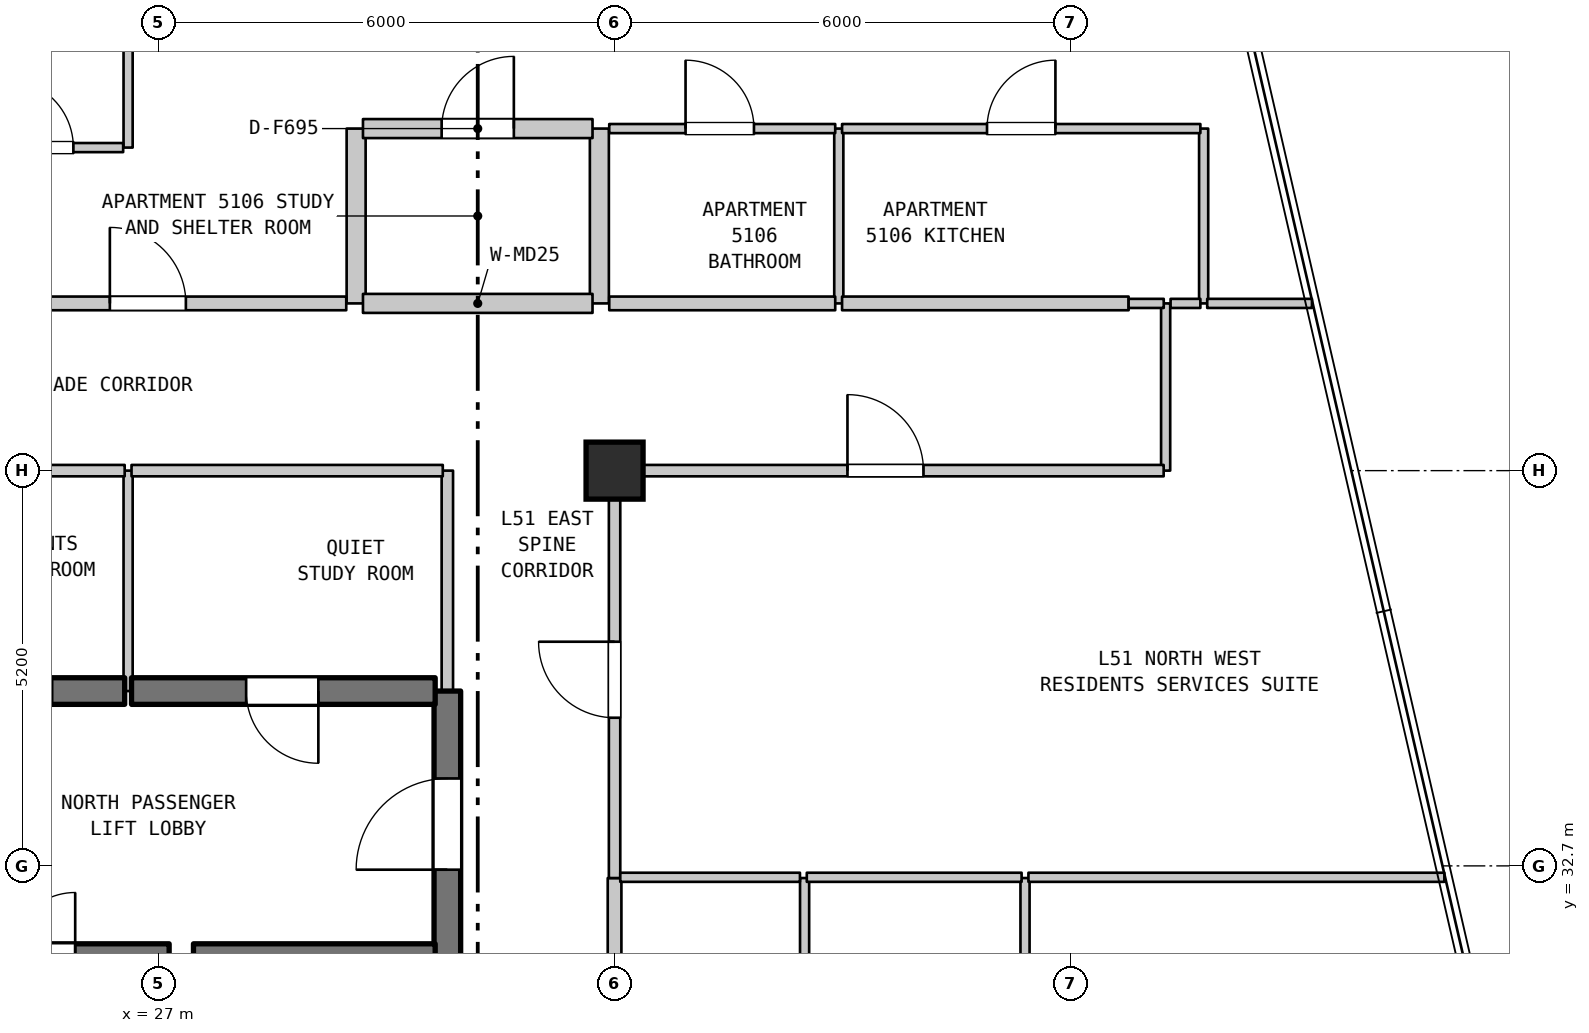
"""IFC4 building model, lengths in metres.
Left out: names, types, materials, properties, quantities, classifications, styles, units other than length and angle.
Written with IfcOpenShell. Run it as: python <this file> out.ifc"""

import sys

from ifc_helpers import new_model, si_unit, direction, frame, frame_2d, origin, origin_2d, place, context, subcontext, project, spatial, rectangle, extrude, element, fill, save


model = new_model("IFC4")
c1 = context("Model", 3, precision=1e-05, world=origin(), true_north=direction((0.0, 1.0)))
c2 = subcontext(c1, "Body", "Model", "MODEL_VIEW")
j1 = project(units=[si_unit("LENGTHUNIT", "METRE"), si_unit("PLANEANGLEUNIT", "RADIAN")], contexts=[c1])
p1 = place(None, origin())
s1 = spatial("IfcSite", under=j1, at=p1, CompositionType="ELEMENT")
p2 = place(p1, origin())
s2 = spatial("IfcBuilding", under=s1, at=p2, CompositionType="ELEMENT")
p3 = place(p2, frame((0.0, 0.0, 206.9)))
s3 = spatial("IfcBuildingStorey", under=s2, at=p3, CompositionType="ELEMENT", Elevation=206.9)
p4 = place(p3, frame((33.0, 37.9, 0.0), z_axis=(0.0, 0.0, 1.0), x_axis=(1.0, 0.0, 0.0)))
e1 = element("IfcColumn", 1, at=p4, inside=s3, PredefinedType="COLUMN", context=c2, shape_type="SweptSolid", body=[
    extrude(rectangle(XDim=0.75, YDim=0.75, at=origin_2d()), origin(), (0.0, 0.0, 1.0), 3.7),
])
p5 = place(p3, frame((26.6, 35.0, 0.0), z_axis=(0.0, 0.0, 1.0), x_axis=(0.0, 1.0, 0.0)))
e2 = element("IfcWall", 2, at=p5, inside=s3, PredefinedType="PARTITIONING", context=c2, shape_type="SweptSolid", body=[
    extrude(rectangle(XDim=2.9, YDim=0.12, at=frame_2d((1.45, 0.0))), origin(), (0.0, 0.0, 1.0), 3.39),
])
p6 = place(p3, frame((26.6, 42.15, 0.0), z_axis=(0.0, 0.0, 1.0), x_axis=(0.0, 1.0, 0.0)))
e3 = element("IfcWall", 3, at=p6, inside=s3, PredefinedType="PARTITIONING", context=c2, shape_type="SweptSolid", body=[
    extrude(rectangle(XDim=11.74, YDim=0.12, at=frame_2d((5.87, 0.0))), origin(), (0.0, 0.0, 1.0), 3.39),
])
p7 = place(p3, frame((29.6, 40.1, 0.0), z_axis=(0.0, 0.0, 1.0), x_axis=(0.0, 1.0, 0.0)))
e4 = element("IfcWall", 4, at=p7, inside=s3, PredefinedType="STANDARD", context=c2, shape_type="SweptSolid", body=[
    extrude(rectangle(XDim=2.3, YDim=0.25, at=frame_2d((1.15, 0.0))), origin(), (0.0, 0.0, 1.0), 3.39),
])
p8 = place(p3, frame((30.8, 31.5, 0.0), z_axis=(0.0, 0.0, 1.0), x_axis=(0.0, 1.0, 0.0)))
e5 = element("IfcWall", 5, at=p8, inside=s3, PredefinedType="SHEAR", context=c2, shape_type="SweptSolid", body=[
    extrude(rectangle(XDim=3.5, YDim=0.35, at=frame_2d((1.75, 0.0))), origin(), (0.0, 0.0, 1.0), 3.39),
])
p9 = place(p8, frame((1.15, 0.0, 0.0)))
e6 = element("IfcOpeningElement", 6, at=p9, cuts=e5, PredefinedType="OPENING", context=c2, shape_type="SweptSolid", body=[
    extrude(rectangle(XDim=1.2, YDim=2.2, at=frame_2d((0.6, 1.1))), frame((0.0, 0.185, 0.0), z_axis=(0.0, -1.0, 0.0), x_axis=(1.0, 0.0, 0.0)), (0.0, 0.0, 1.0), 0.37),
])
p10 = place(p3, frame((30.8, 35.0, 0.0), z_axis=(0.0, 0.0, 1.0), x_axis=(0.0, 1.0, 0.0)))
e7 = element("IfcWall", 7, at=p10, inside=s3, PredefinedType="STANDARD", context=c2, shape_type="SweptSolid", body=[
    extrude(rectangle(XDim=2.9, YDim=0.15, at=frame_2d((1.45, 0.0))), origin(), (0.0, 0.0, 1.0), 3.39),
])
p11 = place(p3, frame((32.8, 40.1, 0.0), z_axis=(0.0, 0.0, 1.0), x_axis=(0.0, 1.0, 0.0)))
e8 = element("IfcWall", 8, at=p11, inside=s3, PredefinedType="STANDARD", context=c2, shape_type="SweptSolid", body=[
    extrude(rectangle(XDim=2.3, YDim=0.25, at=frame_2d((1.15, 0.0))), origin(), (0.0, 0.0, 1.0), 3.39),
])
p12 = place(p3, frame((33.0, 27.47, 0.0), z_axis=(0.0, 0.0, 1.0), x_axis=(0.0, 1.0, 0.0)))
e9 = element("IfcWall", 9, at=p12, inside=s3, PredefinedType="STANDARD", context=c2, shape_type="SweptSolid", body=[
    extrude(rectangle(XDim=5.07, YDim=0.18, at=frame_2d((2.535, 0.0))), origin(), (0.0, 0.0, 1.0), 2.89),
])
p13 = place(p3, frame((33.0, 32.54, 0.0), z_axis=(0.0, 0.0, 1.0), x_axis=(0.0, 1.0, 0.0)))
e10 = element("IfcWall", 10, at=p13, inside=s3, PredefinedType="STANDARD", context=c2, shape_type="SweptSolid", body=[
    extrude(rectangle(XDim=5.36, YDim=0.15, at=frame_2d((2.68, 0.0))), origin(), (0.0, 0.0, 1.0), 2.89),
])
p14 = place(p13, frame((2.109, 0.0, 0.0)))
e11 = element("IfcOpeningElement", 11, at=p14, cuts=e10, PredefinedType="OPENING", context=c2, shape_type="SweptSolid", body=[
    extrude(rectangle(XDim=1.0, YDim=2.15, at=frame_2d((0.5, 1.075))), frame((0.0, 0.085, 0.0), z_axis=(0.0, -1.0, 0.0), x_axis=(1.0, 0.0, 0.0)), (0.0, 0.0, 1.0), 0.17),
])
p15 = place(p3, frame((35.5, 27.47, 0.0), z_axis=(0.0, 0.0, 1.0), x_axis=(0.0, 1.0, 0.0)))
e12 = element("IfcWall", 12, at=p15, inside=s3, PredefinedType="PARTITIONING", context=c2, shape_type="SweptSolid", body=[
    extrude(rectangle(XDim=5.07, YDim=0.12, at=frame_2d((2.535, 0.0))), origin(), (0.0, 0.0, 1.0), 3.39),
])
p16 = place(p3, frame((35.95, 40.1, 0.0), z_axis=(0.0, 0.0, 1.0), x_axis=(0.0, 1.0, 0.0)))
e13 = element("IfcWall", 13, at=p16, inside=s3, PredefinedType="PARTITIONING", context=c2, shape_type="SweptSolid", body=[
    extrude(rectangle(XDim=2.3, YDim=0.12, at=frame_2d((1.15, 0.0))), origin(), (0.0, 0.0, 1.0), 3.39),
])
p17 = place(p3, frame((38.4, 27.47, 0.0), z_axis=(0.0, 0.0, 1.0), x_axis=(0.0, 1.0, 0.0)))
e14 = element("IfcWall", 14, at=p17, inside=s3, PredefinedType="PARTITIONING", context=c2, shape_type="SweptSolid", body=[
    extrude(rectangle(XDim=5.07, YDim=0.12, at=frame_2d((2.535, 0.0))), origin(), (0.0, 0.0, 1.0), 3.39),
])
p18 = place(p3, frame((40.25, 37.9, 0.0), z_axis=(0.0, 0.0, 1.0), x_axis=(0.0, 1.0, 0.0)))
e15 = element("IfcWall", 15, at=p18, inside=s3, PredefinedType="PARTITIONING", context=c2, shape_type="SweptSolid", body=[
    extrude(rectangle(XDim=2.2, YDim=0.12, at=frame_2d((1.1, 0.0))), origin(), (0.0, 0.0, 1.0), 3.39),
])
p19 = place(p3, frame((40.75, 40.1, 0.0), z_axis=(0.0, 0.0, 1.0), x_axis=(0.0, 1.0, 0.0)))
e16 = element("IfcWall", 16, at=p19, inside=s3, PredefinedType="PARTITIONING", context=c2, shape_type="SweptSolid", body=[
    extrude(rectangle(XDim=2.3, YDim=0.12, at=frame_2d((1.15, 0.0))), origin(), (0.0, 0.0, 1.0), 3.39),
])
p20 = place(p3, frame((23.96, 31.5, 0.0), z_axis=(0.0, 0.0, 1.0), x_axis=(1.0, 0.0, 0.0)))
e17 = element("IfcWall", 17, at=p20, inside=s3, PredefinedType="SHEAR", context=c2, shape_type="SweptSolid", body=[
    extrude(rectangle(XDim=3.18, YDim=0.35, at=frame_2d((1.59, 0.0))), origin(), (0.0, 0.0, 1.0), 3.39),
])
p21 = place(p20, frame((1.094, 0.0, 0.0)))
e18 = element("IfcOpeningElement", 18, at=p21, cuts=e17, PredefinedType="OPENING", context=c2, shape_type="SweptSolid", body=[
    extrude(rectangle(XDim=0.85, YDim=2.1, at=frame_2d((0.425, 1.05))), frame((0.0, 0.185, 0.0), z_axis=(0.0, -1.0, 0.0), x_axis=(1.0, 0.0, 0.0)), (0.0, 0.0, 1.0), 0.37),
])
p22 = place(p3, frame((27.46, 31.5, 0.0), z_axis=(0.0, 0.0, 1.0), x_axis=(1.0, 0.0, 0.0)))
e19 = element("IfcWall", 19, at=p22, inside=s3, PredefinedType="SHEAR", context=c2, shape_type="SweptSolid", body=[
    extrude(rectangle(XDim=3.18, YDim=0.35, at=frame_2d((1.59, 0.0))), origin(), (0.0, 0.0, 1.0), 3.39),
])
p23 = place(p3, frame((33.075, 32.55, 0.0), z_axis=(0.0, 0.0, 1.0), x_axis=(1.0, 0.0, 0.0)))
e20 = element("IfcWall", 20, at=p23, inside=s3, PredefinedType="PARTITIONING", context=c2, shape_type="SweptSolid", body=[
    extrude(rectangle(XDim=2.364, YDim=0.12, at=frame_2d((1.182, 0.0))), origin(), (0.0, 0.0, 1.0), 3.39),
])
p24 = place(p3, frame((35.529, 32.55, 0.0), z_axis=(0.0, 0.0, 1.0), x_axis=(1.0, 0.0, 0.0)))
e21 = element("IfcWall", 21, at=p24, inside=s3, PredefinedType="PARTITIONING", context=c2, shape_type="SweptSolid", body=[
    extrude(rectangle(XDim=2.826, YDim=0.12, at=frame_2d((1.413, 0.0))), origin(), (0.0, 0.0, 1.0), 3.39),
])
p25 = place(p3, frame((38.445, 32.55, 0.0), z_axis=(0.0, 0.0, 1.0), x_axis=(1.0, 0.0, 0.0)))
e22 = element("IfcWall", 22, at=p25, inside=s3, PredefinedType="PARTITIONING", context=c2, shape_type="SweptSolid", body=[
    extrude(rectangle(XDim=5.472, YDim=0.12, at=frame_2d((2.736, 0.0))), origin(), (0.0, 0.0, 1.0), 3.39),
])
p26 = place(p3, frame((23.96, 35.0, 0.0), z_axis=(0.0, 0.0, 1.0), x_axis=(1.0, 0.0, 0.0)))
e23 = element("IfcWall", 23, at=p26, inside=s3, PredefinedType="SHEAR", context=c2, shape_type="SweptSolid", body=[
    extrude(rectangle(XDim=2.595, YDim=0.35, at=frame_2d((1.297, 0.0))), origin(), (0.0, 0.0, 1.0), 3.39),
])
p27 = place(p26, frame((0.691, 0.0, 0.0)))
e24 = element("IfcOpeningElement", 24, at=p27, cuts=e23, PredefinedType="OPENING", context=c2, shape_type="SweptSolid", body=[
    extrude(rectangle(XDim=0.95, YDim=2.15, at=frame_2d((0.475, 1.075))), frame((0.0, 0.185, 0.0), z_axis=(0.0, -1.0, 0.0), x_axis=(1.0, 0.0, 0.0)), (0.0, 0.0, 1.0), 0.37),
])
p28 = place(p3, frame((26.645, 35.0, 0.0), z_axis=(0.0, 0.0, 1.0), x_axis=(1.0, 0.0, 0.0)))
e25 = element("IfcWall", 25, at=p28, inside=s3, PredefinedType="SHEAR", context=c2, shape_type="SweptSolid", body=[
    extrude(rectangle(XDim=3.995, YDim=0.35, at=frame_2d((1.998, 0.0))), origin(), (0.0, 0.0, 1.0), 3.39),
])
p29 = place(p28, frame((1.508, 0.0, 0.0)))
e26 = element("IfcOpeningElement", 26, at=p29, cuts=e25, PredefinedType="OPENING", context=c2, shape_type="SweptSolid", body=[
    extrude(rectangle(XDim=0.95, YDim=2.15, at=frame_2d((0.475, 1.075))), frame((0.0, 0.185, 0.0), z_axis=(0.0, -1.0, 0.0), x_axis=(1.0, 0.0, 0.0)), (0.0, 0.0, 1.0), 0.37),
])
p30 = place(p3, frame((23.96, 37.9, 0.0), z_axis=(0.0, 0.0, 1.0), x_axis=(1.0, 0.0, 0.0)))
e27 = element("IfcWall", 27, at=p30, inside=s3, PredefinedType="STANDARD", context=c2, shape_type="SweptSolid", body=[
    extrude(rectangle(XDim=2.595, YDim=0.15, at=frame_2d((1.297, 0.0))), origin(), (0.0, 0.0, 1.0), 2.89),
])
p31 = place(p3, frame((26.645, 37.9, 0.0), z_axis=(0.0, 0.0, 1.0), x_axis=(1.0, 0.0, 0.0)))
e28 = element("IfcWall", 28, at=p31, inside=s3, PredefinedType="STANDARD", context=c2, shape_type="SweptSolid", body=[
    extrude(rectangle(XDim=4.095, YDim=0.15, at=frame_2d((2.047, 0.0))), origin(), (0.0, 0.0, 1.0), 2.89),
])
p32 = place(p3, frame((33.06, 37.9, 0.0), z_axis=(0.0, 0.0, 1.0), x_axis=(1.0, 0.0, 0.0)))
e29 = element("IfcWall", 29, at=p32, inside=s3, PredefinedType="STANDARD", context=c2, shape_type="SweptSolid", body=[
    extrude(rectangle(XDim=7.164, YDim=0.15, at=frame_2d((3.582, 0.0))), origin(), (0.0, 0.0, 1.0), 3.39),
])
p33 = place(p32, frame((3.004, 0.0, 0.0)))
e30 = element("IfcOpeningElement", 30, at=p33, cuts=e29, PredefinedType="OPENING", context=c2, shape_type="SweptSolid", body=[
    extrude(rectangle(XDim=1.0, YDim=2.15, at=frame_2d((0.5, 1.075))), frame((0.0, 0.085, 0.0), z_axis=(0.0, -1.0, 0.0), x_axis=(1.0, 0.0, 0.0)), (0.0, 0.0, 1.0), 0.17),
])
p34 = place(p3, frame((19.125, 40.1, 0.0), z_axis=(0.0, 0.0, 1.0), x_axis=(1.0, 0.0, 0.0)))
e31 = element("IfcWall", 31, at=p34, inside=s3, PredefinedType="STANDARD", context=c2, shape_type="SweptSolid", body=[
    extrude(rectangle(XDim=10.345, YDim=0.18, at=frame_2d((5.172, 0.0))), origin(), (0.0, 0.0, 1.0), 3.39),
])
p35 = place(p34, frame((2.035, 0.0, 0.0)))
e32 = element("IfcOpeningElement", 32, at=p35, cuts=e31, PredefinedType="OPENING", context=c2, shape_type="SweptSolid", body=[
    extrude(rectangle(XDim=1.0, YDim=2.15, at=frame_2d((0.5, 1.075))), frame((0.0, 0.1, 0.0), z_axis=(0.0, -1.0, 0.0), x_axis=(1.0, 0.0, 0.0)), (0.0, 0.0, 1.0), 0.2),
])
p36 = place(p34, frame((7.235, 0.0, 0.0)))
e33 = element("IfcOpeningElement", 33, at=p36, cuts=e31, PredefinedType="OPENING", context=c2, shape_type="SweptSolid", body=[
    extrude(rectangle(XDim=1.0, YDim=2.15, at=frame_2d((0.5, 1.075))), frame((0.0, 0.1, 0.0), z_axis=(0.0, -1.0, 0.0), x_axis=(1.0, 0.0, 0.0)), (0.0, 0.0, 1.0), 0.2),
])
p37 = place(p3, frame((29.69, 40.1, 0.0), z_axis=(0.0, 0.0, 1.0), x_axis=(1.0, 0.0, 0.0)))
e34 = element("IfcWall", 34, at=p37, inside=s3, PredefinedType="STANDARD", context=c2, shape_type="SweptSolid", body=[
    extrude(rectangle(XDim=3.02, YDim=0.25, at=frame_2d((1.51, 0.0))), origin(), (0.0, 0.0, 1.0), 3.39),
])
p38 = place(p3, frame((32.93, 40.1, 0.0), z_axis=(0.0, 0.0, 1.0), x_axis=(1.0, 0.0, 0.0)))
e35 = element("IfcWall", 35, at=p38, inside=s3, PredefinedType="STANDARD", context=c2, shape_type="SweptSolid", body=[
    extrude(rectangle(XDim=2.973, YDim=0.18, at=frame_2d((1.487, 0.0))), origin(), (0.0, 0.0, 1.0), 3.39),
])
p39 = place(p3, frame((35.993, 40.1, 0.0), z_axis=(0.0, 0.0, 1.0), x_axis=(1.0, 0.0, 0.0)))
e36 = element("IfcWall", 36, at=p39, inside=s3, PredefinedType="STANDARD", context=c2, shape_type="SweptSolid", body=[
    extrude(rectangle(XDim=3.77, YDim=0.18, at=frame_2d((1.885, 0.0))), origin(), (0.0, 0.0, 1.0), 3.39),
])
p40 = place(p3, frame((39.763, 40.1, 0.0), z_axis=(0.0, 0.0, 1.0), x_axis=(1.0, 0.0, 0.0)))
e37 = element("IfcWall", 37, at=p40, inside=s3, PredefinedType="PARTITIONING", context=c2, shape_type="SweptSolid", body=[
    extrude(rectangle(XDim=0.462, YDim=0.12, at=frame_2d((0.231, 0.0))), origin(), (0.0, 0.0, 1.0), 3.39),
])
p41 = place(p3, frame((40.315, 40.1, 0.0), z_axis=(0.0, 0.0, 1.0), x_axis=(1.0, 0.0, 0.0)))
e38 = element("IfcWall", 38, at=p41, inside=s3, PredefinedType="PARTITIONING", context=c2, shape_type="SweptSolid", body=[
    extrude(rectangle(XDim=0.392, YDim=0.12, at=frame_2d((0.196, 0.0))), origin(), (0.0, 0.0, 1.0), 3.39),
])
p42 = place(p3, frame((40.797, 40.1, 0.0), z_axis=(0.0, 0.0, 1.0), x_axis=(1.0, 0.0, 0.0)))
e39 = element("IfcWall", 39, at=p42, inside=s3, PredefinedType="PARTITIONING", context=c2, shape_type="SweptSolid", body=[
    extrude(rectangle(XDim=1.378, YDim=0.12, at=frame_2d((0.689, 0.0))), origin(), (0.0, 0.0, 1.0), 3.39),
])
p43 = place(p3, frame((22.125, 42.15, 0.0), z_axis=(0.0, 0.0, 1.0), x_axis=(1.0, 0.0, 0.0)))
e40 = element("IfcWall", 40, at=p43, inside=s3, PredefinedType="PARTITIONING", context=c2, shape_type="SweptSolid", body=[
    extrude(rectangle(XDim=4.41, YDim=0.12, at=frame_2d((2.205, 0.0))), origin(), (0.0, 0.0, 1.0), 3.39),
])
p44 = place(p43, frame((0.655, 0.0, 0.0)))
e41 = element("IfcOpeningElement", 41, at=p44, cuts=e40, PredefinedType="OPENING", context=c2, shape_type="SweptSolid", body=[
    extrude(rectangle(XDim=0.9, YDim=2.15, at=frame_2d((0.45, 1.075))), frame((0.0, 0.07, 0.0), z_axis=(0.0, -1.0, 0.0), x_axis=(1.0, 0.0, 0.0)), (0.0, 0.0, 1.0), 0.14),
])
p45 = place(p43, frame((2.855, 0.0, 0.0)))
e42 = element("IfcOpeningElement", 42, at=p45, cuts=e40, PredefinedType="OPENING", context=c2, shape_type="SweptSolid", body=[
    extrude(rectangle(XDim=0.9, YDim=2.15, at=frame_2d((0.45, 1.075))), frame((0.0, 0.07, 0.0), z_axis=(0.0, -1.0, 0.0), x_axis=(1.0, 0.0, 0.0)), (0.0, 0.0, 1.0), 0.14),
])
p46 = place(p3, frame((29.69, 42.4, 0.0), z_axis=(0.0, 0.0, 1.0), x_axis=(1.0, 0.0, 0.0)))
e43 = element("IfcWall", 43, at=p46, inside=s3, PredefinedType="STANDARD", context=c2, shape_type="SweptSolid", body=[
    extrude(rectangle(XDim=3.02, YDim=0.25, at=frame_2d((1.51, 0.0))), origin(), (0.0, 0.0, 1.0), 3.39),
])
p47 = place(p46, frame((1.035, 0.0, 0.0)))
e44 = element("IfcOpeningElement", 44, at=p47, cuts=e43, PredefinedType="OPENING", context=c2, shape_type="SweptSolid", body=[
    extrude(rectangle(XDim=0.95, YDim=2.15, at=frame_2d((0.475, 1.075))), frame((0.0, 0.135, 0.0), z_axis=(0.0, -1.0, 0.0), x_axis=(1.0, 0.0, 0.0)), (0.0, 0.0, 1.0), 0.27),
])
p48 = place(p3, frame((32.93, 42.4, 0.0), z_axis=(0.0, 0.0, 1.0), x_axis=(1.0, 0.0, 0.0)))
e45 = element("IfcWall", 45, at=p48, inside=s3, PredefinedType="PARTITIONING", context=c2, shape_type="SweptSolid", body=[
    extrude(rectangle(XDim=2.973, YDim=0.12, at=frame_2d((1.487, 0.0))), origin(), (0.0, 0.0, 1.0), 3.39),
])
p49 = place(p48, frame((1.004, 0.0, 0.0)))
e46 = element("IfcOpeningElement", 46, at=p49, cuts=e45, PredefinedType="OPENING", context=c2, shape_type="SweptSolid", body=[
    extrude(rectangle(XDim=0.9, YDim=2.1, at=frame_2d((0.45, 1.05))), frame((0.0, 0.07, 0.0), z_axis=(0.0, -1.0, 0.0), x_axis=(1.0, 0.0, 0.0)), (0.0, 0.0, 1.0), 0.14),
])
p50 = place(p3, frame((35.993, 42.4, 0.0), z_axis=(0.0, 0.0, 1.0), x_axis=(1.0, 0.0, 0.0)))
e47 = element("IfcWall", 47, at=p50, inside=s3, PredefinedType="PARTITIONING", context=c2, shape_type="SweptSolid", body=[
    extrude(rectangle(XDim=4.714, YDim=0.12, at=frame_2d((2.357, 0.0))), origin(), (0.0, 0.0, 1.0), 3.39),
])
p51 = place(p50, frame((1.907, 0.0, 0.0)))
e48 = element("IfcOpeningElement", 48, at=p51, cuts=e47, PredefinedType="OPENING", context=c2, shape_type="SweptSolid", body=[
    extrude(rectangle(XDim=0.9, YDim=2.15, at=frame_2d((0.45, 1.075))), frame((0.0, 0.07, 0.0), z_axis=(0.0, -1.0, 0.0), x_axis=(1.0, 0.0, 0.0)), (0.0, 0.0, 1.0), 0.14),
])
p52 = place(p9, origin())
e49 = element("IfcDoor", 49, at=p52, inside=s3, OperationType="SINGLE_SWING_LEFT", PredefinedType="DOOR", context=c2, shape_type="SweptSolid", body=[
    extrude(rectangle(XDim=1.2, YDim=2.2, at=frame_2d((0.6, 1.1))), frame((0.0, 0.025, 0.0), z_axis=(0.0, -1.0, 0.0), x_axis=(1.0, 0.0, 0.0)), (0.0, 0.0, 1.0), 0.05),
])
fill(e6, e49)
p53 = place(p14, origin())
e50 = element("IfcDoor", 50, at=p53, inside=s3, OperationType="SINGLE_SWING_RIGHT", PredefinedType="DOOR", context=c2, shape_type="SweptSolid", body=[
    extrude(rectangle(XDim=1.0, YDim=2.15, at=frame_2d((0.5, 1.075))), frame((0.0, 0.025, 0.0), z_axis=(0.0, -1.0, 0.0), x_axis=(1.0, 0.0, 0.0)), (0.0, 0.0, 1.0), 0.05),
])
fill(e11, e50)
p54 = place(p27, frame((0.95, 0.0, 0.0), z_axis=(0.0, 0.0, 1.0), x_axis=(-1.0, 0.0, 0.0)))
e51 = element("IfcDoor", 51, at=p54, inside=s3, OperationType="SINGLE_SWING_LEFT", PredefinedType="DOOR", context=c2, shape_type="SweptSolid", body=[
    extrude(rectangle(XDim=0.95, YDim=2.15, at=frame_2d((0.475, 1.075))), frame((0.0, 0.025, 0.0), z_axis=(0.0, -1.0, 0.0), x_axis=(1.0, 0.0, 0.0)), (0.0, 0.0, 1.0), 0.05),
])
fill(e24, e51)
p55 = place(p29, frame((0.95, 0.0, 0.0), z_axis=(0.0, 0.0, 1.0), x_axis=(-1.0, 0.0, 0.0)))
e52 = element("IfcDoor", 52, at=p55, inside=s3, OperationType="SINGLE_SWING_RIGHT", PredefinedType="DOOR", context=c2, shape_type="SweptSolid", body=[
    extrude(rectangle(XDim=0.95, YDim=2.15, at=frame_2d((0.475, 1.075))), frame((0.0, 0.025, 0.0), z_axis=(0.0, -1.0, 0.0), x_axis=(1.0, 0.0, 0.0)), (0.0, 0.0, 1.0), 0.05),
])
fill(e26, e52)
p56 = place(p33, origin())
e53 = element("IfcDoor", 53, at=p56, inside=s3, OperationType="SINGLE_SWING_LEFT", PredefinedType="DOOR", context=c2, shape_type="SweptSolid", body=[
    extrude(rectangle(XDim=1.0, YDim=2.15, at=frame_2d((0.5, 1.075))), frame((0.0, 0.025, 0.0), z_axis=(0.0, -1.0, 0.0), x_axis=(1.0, 0.0, 0.0)), (0.0, 0.0, 1.0), 0.05),
])
fill(e30, e53)
p57 = place(p36, origin())
e54 = element("IfcDoor", 54, at=p57, inside=s3, OperationType="SINGLE_SWING_LEFT", PredefinedType="DOOR", context=c2, shape_type="SweptSolid", body=[
    extrude(rectangle(XDim=1.0, YDim=2.15, at=frame_2d((0.5, 1.075))), frame((0.0, 0.025, 0.0), z_axis=(0.0, -1.0, 0.0), x_axis=(1.0, 0.0, 0.0)), (0.0, 0.0, 1.0), 0.05),
])
fill(e33, e54)
p58 = place(p45, origin())
e55 = element("IfcDoor", 55, at=p58, inside=s3, OperationType="SINGLE_SWING_LEFT", PredefinedType="DOOR", context=c2, shape_type="SweptSolid", body=[
    extrude(rectangle(XDim=0.9, YDim=2.15, at=frame_2d((0.45, 1.075))), frame((0.0, 0.025, 0.0), z_axis=(0.0, -1.0, 0.0), x_axis=(1.0, 0.0, 0.0)), (0.0, 0.0, 1.0), 0.05),
])
fill(e42, e55)
p59 = place(p47, origin())
e56 = element("IfcDoor", 56, at=p59, inside=s3, OperationType="SINGLE_SWING_RIGHT", PredefinedType="DOOR", context=c2, shape_type="SweptSolid", body=[
    extrude(rectangle(XDim=0.95, YDim=2.15, at=frame_2d((0.475, 1.075))), frame((0.0, 0.025, 0.0), z_axis=(0.0, -1.0, 0.0), x_axis=(1.0, 0.0, 0.0)), (0.0, 0.0, 1.0), 0.05),
])
fill(e44, e56)
p60 = place(p49, origin())
e57 = element("IfcDoor", 57, at=p60, inside=s3, OperationType="SINGLE_SWING_LEFT", PredefinedType="DOOR", context=c2, shape_type="SweptSolid", body=[
    extrude(rectangle(XDim=0.9, YDim=2.1, at=frame_2d((0.45, 1.05))), frame((0.0, 0.025, 0.0), z_axis=(0.0, -1.0, 0.0), x_axis=(1.0, 0.0, 0.0)), (0.0, 0.0, 1.0), 0.05),
])
fill(e46, e57)
p61 = place(p51, origin())
e58 = element("IfcDoor", 58, at=p61, inside=s3, OperationType="SINGLE_SWING_RIGHT", PredefinedType="DOOR", context=c2, shape_type="SweptSolid", body=[
    extrude(rectangle(XDim=0.9, YDim=2.15, at=frame_2d((0.45, 1.075))), frame((0.0, 0.025, 0.0), z_axis=(0.0, -1.0, 0.0), x_axis=(1.0, 0.0, 0.0)), (0.0, 0.0, 1.0), 0.05),
])
fill(e48, e58)
save(model, sys.argv[1])
